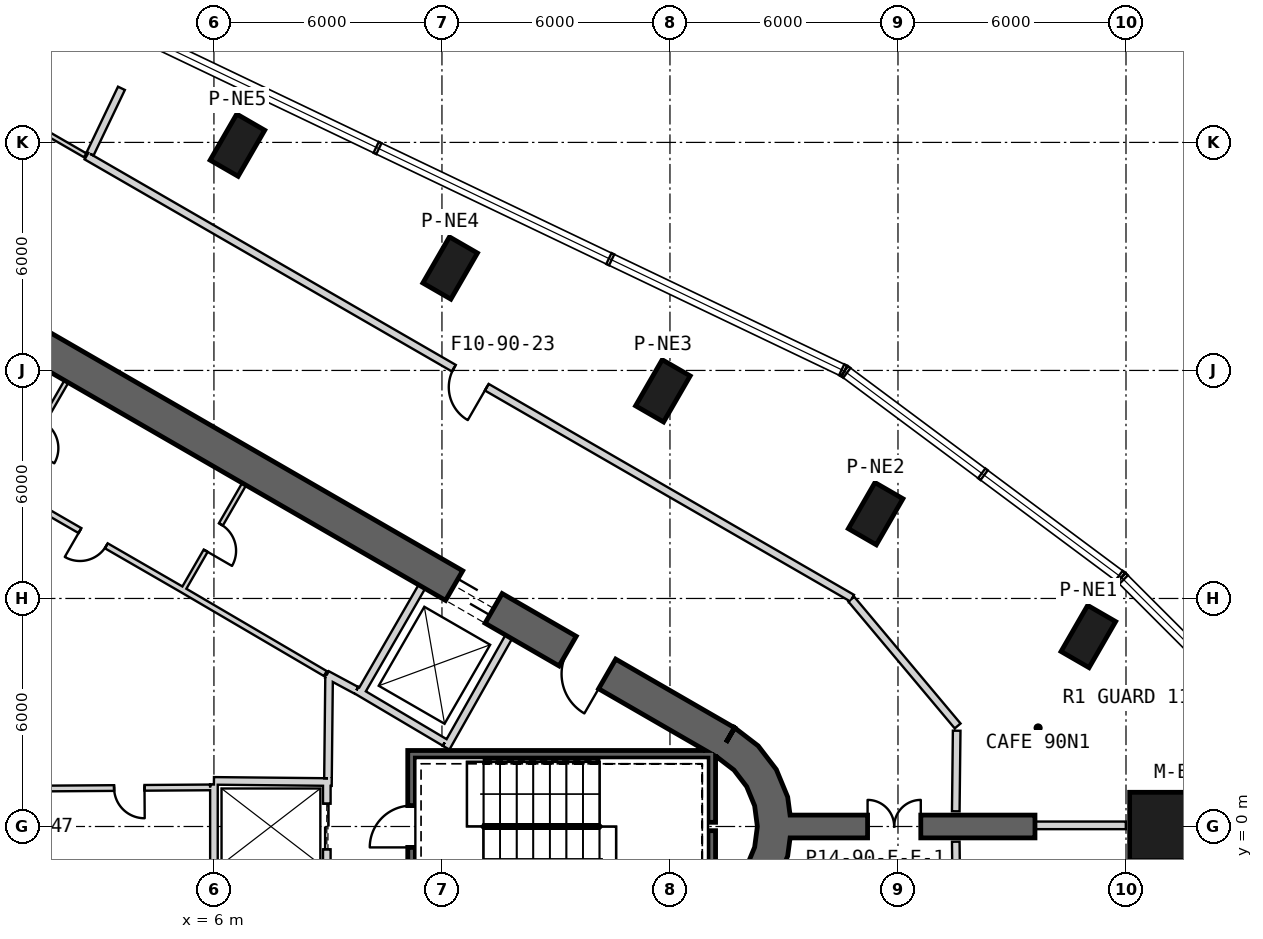
"""IFC4 building model, lengths in metres.
Left out: names, types, materials, properties, quantities, classifications, styles, units other than length and angle.
Written with IfcOpenShell. Run it as: python <this file> out.ifc"""

import sys

from ifc_helpers import new_model, si_unit, direction, frame, frame_2d, origin, origin_2d, place, context, subcontext, project, spatial, polyline, rectangle, outline, extrude, element, fill, save


model = new_model("IFC4")
c1 = context("Model", 3, precision=1e-05, world=origin(), true_north=direction((0.0, 1.0)))
c2 = subcontext(c1, "Body", "Model", "MODEL_VIEW")
j1 = project(units=[si_unit("LENGTHUNIT", "METRE"), si_unit("PLANEANGLEUNIT", "RADIAN")], contexts=[c1])
p1 = place(None, origin())
s1 = spatial("IfcSite", under=j1, at=p1, CompositionType="ELEMENT")
p2 = place(p1, origin())
s2 = spatial("IfcBuilding", under=s1, at=p2, CompositionType="ELEMENT")
p3 = place(p2, frame((0.0, 0.0, 392.3)))
s3 = spatial("IfcBuildingStorey", under=s2, at=p3, CompositionType="ELEMENT", Elevation=392.3)
p4 = place(p3, frame((31.196, 0.0, 0.0), z_axis=(0.0, 0.0, 1.0), x_axis=(1.0, 0.0, 0.0)))
e1 = element("IfcColumn", 1, at=p4, inside=s3, PredefinedType="COLUMN", context=c2, shape_type="SweptSolid", body=[
    extrude(rectangle(XDim=2.2, YDim=1.8, at=origin_2d()), origin(), (0.0, 0.0, 1.0), 5.7),
])
for number, where, z_axis, x_axis in (
    (2, (29.01, 4.999, 0.0), (0.0, 0.0, 1.0), (0.5, 0.866, 0.0)),
    (3, (23.412, 8.231, 0.0), (0.0, 0.0, 1.0), (0.5, 0.866, 0.0)),
    (4, (17.814, 11.463, 0.0), (0.0, 0.0, 1.0), (0.5, 0.866, 0.0)),
    (5, (12.216, 14.695, 0.0), (0.0, 0.0, 1.0), (0.5, 0.866, 0.0)),
    (6, (6.618, 17.927, 0.0), (0.0, 0.0, 1.0), (0.5, 0.866, 0.0)),
):
    element("IfcColumn", number, at=place(p3, frame(where, z_axis=z_axis, x_axis=x_axis)), inside=s3, PredefinedType="COLUMN", context=c2, shape_type="SweptSolid", body=[
        extrude(rectangle(XDim=1.4, YDim=0.85, at=origin_2d()), origin(), (0.0, 0.0, 1.0), 5.7),
    ])
p5 = place(p3, frame((19.475, 2.208, 0.0), z_axis=(0.0, 0.0, 1.0), x_axis=(-0.866028369851, 0.499994862586, 0.0)))
e7 = element("IfcWall", 7, at=p5, inside=s3, PredefinedType="SHEAR", context=c2, shape_type="SweptSolid", body=[
    extrude(rectangle(XDim=31.523, YDim=0.9, at=frame_2d((15.762, 0.0))), origin(), (0.0, 0.0, 1.0), 6.0),
])
p6 = place(p5, frame((7.062, 0.0, 0.0)))
e8 = element("IfcOpeningElement", 8, at=p6, cuts=e7, PredefinedType="OPENING", context=c2, shape_type="SweptSolid", body=[
    extrude(rectangle(XDim=1.2, YDim=2.4, at=frame_2d((0.6, 1.2))), frame((0.0, 0.46, 0.0), z_axis=(0.0, -1.0, 0.0), x_axis=(1.0, 0.0, 0.0)), (0.0, 0.0, 1.0), 0.92),
])
p7 = place(p5, frame((3.612, 0.0, 0.0)))
e9 = element("IfcOpeningElement", 9, at=p7, cuts=e7, PredefinedType="OPENING", context=c2, shape_type="SweptSolid", body=[
    extrude(rectangle(XDim=1.2, YDim=2.4, at=frame_2d((0.6, 1.2))), frame((0.0, 0.46, 0.0), z_axis=(0.0, -1.0, 0.0), x_axis=(1.0, 0.0, 0.0)), (0.0, 0.0, 1.0), 0.92),
])
p8 = place(p5, frame((26.712, 0.0, 0.0)))
e10 = element("IfcOpeningElement", 10, at=p8, cuts=e7, PredefinedType="OPENING", context=c2, shape_type="SweptSolid", body=[
    extrude(rectangle(XDim=1.2, YDim=2.4, at=frame_2d((0.6, 1.2))), frame((0.0, 0.46, 0.0), z_axis=(0.0, -1.0, 0.0), x_axis=(1.0, 0.0, 0.0)), (0.0, 0.0, 1.0), 0.92),
])
p9 = place(p3, origin())
e11 = element("IfcWall", 11, at=p9, inside=s3, PredefinedType="SHEAR", context=c2, shape_type="SweptSolid", body=[
    extrude(outline(polyline([(19.7, -2.598), (20.321, -2.121), (20.798, -1.5), (21.098, -0.777), (21.2, 0.0), (21.098, 0.777), (20.798, 1.5), (20.321, 2.121), (19.7, 2.598), (19.25, 1.819), (19.685, 1.485), (20.019, 1.05), (20.229, 0.543), (20.3, 0.0), (20.229, -0.543), (20.019, -1.05), (19.685, -1.485), (19.25, -1.819), (19.7, -2.598)])), origin(), (0.0, 0.0, 1.0), 6.0),
])
p10 = place(p3, frame((21.15, 0.0, 0.0), z_axis=(0.0, 0.0, 1.0), x_axis=(1.0, 0.0, 0.0)))
e12 = element("IfcWall", 12, at=p10, inside=s3, PredefinedType="SHEAR", context=c2, shape_type="SweptSolid", body=[
    extrude(rectangle(XDim=6.455, YDim=0.6, at=frame_2d((3.228, 0.0))), origin(), (0.0, 0.0, 1.0), 6.0),
])
p11 = place(p10, frame((2.05, 0.0, 0.0)))
e13 = element("IfcOpeningElement", 13, at=p11, cuts=e12, PredefinedType="OPENING", context=c2, shape_type="SweptSolid", body=[
    extrude(rectangle(XDim=1.4, YDim=2.4, at=frame_2d((0.7, 1.2))), frame((0.0, 0.31, 0.0), z_axis=(0.0, -1.0, 0.0), x_axis=(1.0, 0.0, 0.0)), (0.0, 0.0, 1.0), 0.62),
])
p12 = place(p3, frame((9.847, 3.495, 0.0), z_axis=(0.0, 0.0, 1.0), x_axis=(0.499984717929, 0.866034226713, 0.0)))
e14 = element("IfcWall", 14, at=p12, inside=s3, PredefinedType="PLUMBINGWALL", context=c2, shape_type="SweptSolid", body=[
    extrude(rectangle(XDim=3.25, YDim=0.2, at=frame_2d((1.625, 0.0))), origin(), (0.0, 0.0, 1.0), 5.7),
])
p13 = place(p3, frame((12.11, 2.073, 0.0), z_axis=(0.0, 0.0, 1.0), x_axis=(0.49196600604, 0.870614408852, 0.0)))
e15 = element("IfcWall", 15, at=p13, inside=s3, PredefinedType="PLUMBINGWALL", context=c2, shape_type="SweptSolid", body=[
    extrude(rectangle(XDim=3.35, YDim=0.2, at=frame_2d((1.675, 0.0))), origin(), (0.0, 0.0, 1.0), 5.7),
])
p14 = place(p3, frame((12.073, 2.211, 0.0), z_axis=(0.0, 0.0, 1.0), x_axis=(-0.860414880418, 0.509594185166, 0.0)))
e16 = element("IfcWall", 16, at=p14, inside=s3, PredefinedType="PLUMBINGWALL", context=c2, shape_type="SweptSolid", body=[
    extrude(rectangle(XDim=2.7, YDim=0.2, at=frame_2d((1.35, 0.0))), origin(), (0.0, 0.0, 1.0), 5.7),
])
p15 = place(p3, frame((19.2, 1.9, -0.35), z_axis=(0.0, 0.0, 1.0), x_axis=(-1.0, 0.0, 0.0)))
e17 = element("IfcWall", 17, at=p15, inside=s3, PredefinedType="SHEAR", context=c2, shape_type="SweptSolid", body=[
    extrude(rectangle(XDim=8.1, YDim=0.2, at=frame_2d((4.05, 0.0))), origin(), (0.0, 0.0, 1.0), 6.05),
])
p16 = place(p3, frame((19.1, -2.0, -0.35), z_axis=(0.0, 0.0, 1.0), x_axis=(0.0, 1.0, 0.0)))
e18 = element("IfcWall", 18, at=p16, inside=s3, PredefinedType="SHEAR", context=c2, shape_type="SweptSolid", body=[
    extrude(rectangle(XDim=1.89, YDim=0.2, at=frame_2d((0.945, 0.0))), origin(), (0.0, 0.0, 1.0), 6.05),
])
p17 = place(p3, frame((19.1, 0.11, -0.35), z_axis=(0.0, 0.0, 1.0), x_axis=(0.0, 1.0, 0.0)))
e19 = element("IfcWall", 19, at=p17, inside=s3, PredefinedType="SHEAR", context=c2, shape_type="SweptSolid", body=[
    extrude(rectangle(XDim=1.69, YDim=0.2, at=frame_2d((0.845, 0.0))), origin(), (0.0, 0.0, 1.0), 6.05),
])
p18 = place(p3, frame((11.2, -1.8, -0.35), z_axis=(0.0, 0.0, 1.0), x_axis=(0.0, 1.0, 0.0)))
e20 = element("IfcWall", 20, at=p18, inside=s3, PredefinedType="SHEAR", context=c2, shape_type="SweptSolid", body=[
    extrude(rectangle(XDim=3.6, YDim=0.2, at=frame_2d((1.8, 0.0))), origin(), (0.0, 0.0, 1.0), 6.05),
])
p19 = place(p18, frame((1.25, 0.0, 0.35)))
e21 = element("IfcOpeningElement", 21, at=p19, cuts=e20, PredefinedType="OPENING", context=c2, shape_type="SweptSolid", body=[
    extrude(rectangle(XDim=1.1, YDim=2.1, at=frame_2d((0.55, 1.05))), frame((0.0, 0.11, 0.0), z_axis=(0.0, -1.0, 0.0), x_axis=(1.0, 0.0, 0.0)), (0.0, 0.0, 1.0), 0.22),
])
p20 = place(p3, frame((8.97, 1.2, 0.0), z_axis=(0.0, 0.0, 1.0), x_axis=(0.0, -1.0, 0.0)))
e22 = element("IfcWall", 22, at=p20, inside=s3, PredefinedType="PLUMBINGWALL", context=c2, shape_type="SweptSolid", body=[
    extrude(rectangle(XDim=2.4, YDim=0.2, at=frame_2d((1.2, 0.0))), origin(), (0.0, 0.0, 1.0), 5.7),
])
p21 = place(p20, frame((0.6, 0.0, 0.0)))
e23 = element("IfcOpeningElement", 23, at=p21, cuts=e22, PredefinedType="OPENING", context=c2, shape_type="SweptSolid", body=[
    extrude(rectangle(XDim=1.2, YDim=2.4, at=frame_2d((0.6, 1.2))), frame((0.0, 0.11, 0.0), z_axis=(0.0, -1.0, 0.0), x_axis=(1.0, 0.0, 0.0)), (0.0, 0.0, 1.0), 0.22),
])
p22 = place(p3, frame((6.0, 1.2, 0.0), z_axis=(0.0, 0.0, 1.0), x_axis=(0.999949988, -0.010001074852, 0.0)))
e24 = element("IfcWall", 24, at=p22, inside=s3, PredefinedType="PLUMBINGWALL", context=c2, shape_type="SweptSolid", body=[
    extrude(rectangle(XDim=3.1, YDim=0.2, at=frame_2d((1.55, 0.0))), origin(), (0.0, 0.0, 1.0), 5.7),
])
p23 = place(p3, frame((6.0, -1.1, 0.0), z_axis=(0.0, 0.0, 1.0), x_axis=(0.0, 1.0, 0.0)))
e25 = element("IfcWall", 25, at=p23, inside=s3, PredefinedType="PLUMBINGWALL", context=c2, shape_type="SweptSolid", body=[
    extrude(rectangle(XDim=2.205, YDim=0.2, at=frame_2d((1.102, 0.0))), origin(), (0.0, 0.0, 1.0), 5.7),
])
p24 = place(p3, frame((6.795, 9.01, 0.0), z_axis=(0.0, 0.0, 1.0), x_axis=(-0.499984717929, -0.866034226713, 0.0)))
e26 = element("IfcWall", 26, at=p24, inside=s3, PredefinedType="PARTITIONING", context=c2, shape_type="SweptSolid", body=[
    extrude(rectangle(XDim=3.25, YDim=0.12, at=frame_2d((1.625, 0.0))), origin(), (0.0, 0.0, 1.0), 5.7),
])
p25 = place(p24, frame((1.225, 0.0, 0.0)))
e27 = element("IfcOpeningElement", 27, at=p25, cuts=e26, PredefinedType="OPENING", context=c2, shape_type="SweptSolid", body=[
    extrude(rectangle(XDim=0.8, YDim=2.1, at=frame_2d((0.4, 1.05))), frame((0.0, 0.07, 0.0), z_axis=(0.0, -1.0, 0.0), x_axis=(1.0, 0.0, 0.0)), (0.0, 0.0, 1.0), 0.14),
])
p26 = place(p3, frame((8.974, 3.999, 0.0), z_axis=(0.0, 0.0, 1.0), x_axis=(0.880917147855, -0.473270513147, 0.0)))
e28 = element("IfcWall", 28, at=p26, inside=s3, PredefinedType="PARTITIONING", context=c2, shape_type="SweptSolid", body=[
    extrude(rectangle(XDim=0.878, YDim=0.2, at=frame_2d((0.439, 0.0))), origin(), (0.0, 0.0, 1.0), 5.7),
])
p27 = place(p3, frame((8.931, 4.025, 0.0), z_axis=(0.0, 0.0, 1.0), x_axis=(-0.862666884027, 0.505772525157, 0.0)))
e29 = element("IfcWall", 29, at=p27, inside=s3, PredefinedType="PLUMBINGWALL", context=c2, shape_type="SweptSolid", body=[
    extrude(rectangle(XDim=4.372, YDim=0.15, at=frame_2d((2.186, 0.0))), origin(), (0.0, 0.0, 1.0), 5.7),
])
p28 = place(p3, frame((2.119, 11.709, 0.0), z_axis=(0.0, 0.0, 1.0), x_axis=(-0.500017246033, -0.866015446554, 0.0)))
e30 = element("IfcWall", 30, at=p28, inside=s3, PredefinedType="PARTITIONING", context=c2, shape_type="SweptSolid", body=[
    extrude(rectangle(XDim=3.25, YDim=0.12, at=frame_2d((1.625, 0.0))), origin(), (0.0, 0.0, 1.0), 5.7),
])
p29 = place(p28, frame((1.225, 0.0, 0.0)))
e31 = element("IfcOpeningElement", 31, at=p29, cuts=e30, PredefinedType="OPENING", context=c2, shape_type="SweptSolid", body=[
    extrude(rectangle(XDim=0.8, YDim=2.1, at=frame_2d((0.4, 1.05))), frame((0.0, 0.07, 0.0), z_axis=(0.0, -1.0, 0.0), x_axis=(1.0, 0.0, 0.0)), (0.0, 0.0, 1.0), 0.14),
])
p30 = place(p3, frame((5.159, 6.236, 0.0), z_axis=(0.0, 0.0, 1.0), x_axis=(-0.866028230842, 0.499995103361, 0.0)))
e32 = element("IfcWall", 32, at=p30, inside=s3, PredefinedType="PLUMBINGWALL", context=c2, shape_type="SweptSolid", body=[
    extrude(rectangle(XDim=5.4, YDim=0.15, at=frame_2d((2.7, 0.0))), origin(), (0.0, 0.0, 1.0), 5.7),
])
p31 = place(p30, frame((2.3, 0.0, 0.0)))
e33 = element("IfcOpeningElement", 33, at=p31, cuts=e32, PredefinedType="OPENING", context=c2, shape_type="SweptSolid", body=[
    extrude(rectangle(XDim=0.8, YDim=2.1, at=frame_2d((0.4, 1.05))), frame((0.0, 0.085, 0.0), z_axis=(0.0, -1.0, 0.0), x_axis=(1.0, 0.0, 0.0)), (0.0, 0.0, 1.0), 0.17),
])
p32 = place(p3, frame((9.001, 1.27, 0.0), z_axis=(0.0, 0.0, 1.0), x_axis=(0.01074821465, 0.999942236273, 0.0)))
e34 = element("IfcWall", 34, at=p32, inside=s3, PredefinedType="PARTITIONING", context=c2, shape_type="SweptSolid", body=[
    extrude(rectangle(XDim=2.726, YDim=0.2, at=frame_2d((1.363, 0.0))), origin(), (0.0, 0.0, 1.0), 5.7),
])
p33 = place(p3, frame((1.518, 0.999, 0.0), z_axis=(0.0, 0.0, 1.0), x_axis=(0.999976903524, 0.006796500403, 0.0)))
e35 = element("IfcWall", 35, at=p33, inside=s3, PredefinedType="PLUMBINGWALL", context=c2, shape_type="SweptSolid", body=[
    extrude(rectangle(XDim=4.382, YDim=0.15, at=frame_2d((2.191, 0.0))), origin(), (0.0, 0.0, 1.0), 5.7),
])
p34 = place(p33, frame((1.855, 0.0, 0.0)))
e36 = element("IfcOpeningElement", 36, at=p34, cuts=e35, PredefinedType="OPENING", context=c2, shape_type="SweptSolid", body=[
    extrude(rectangle(XDim=0.8, YDim=2.1, at=frame_2d((0.4, 1.05))), frame((0.0, 0.085, 0.0), z_axis=(0.0, -1.0, 0.0), x_axis=(1.0, 0.0, 0.0)), (0.0, 0.0, 1.0), 0.17),
])
p35 = place(p3, frame((22.792, 6.009, 0.0), z_axis=(0.0, 0.0, 1.0), x_axis=(-0.866028288731, 0.499995003092, 0.0)))
e37 = element("IfcWall", 37, at=p35, inside=s3, PredefinedType="PARTITIONING", context=c2, shape_type="SweptSolid", body=[
    extrude(rectangle(XDim=23.262, YDim=0.2, at=frame_2d((11.631, 0.0))), origin(), (0.0, 0.0, 1.0), 5.07),
])
p36 = place(p35, frame((11.1, 0.0, 0.0)))
e38 = element("IfcOpeningElement", 38, at=p36, cuts=e37, PredefinedType="OPENING", context=c2, shape_type="SweptSolid", body=[
    extrude(rectangle(XDim=1.0, YDim=2.1, at=frame_2d((0.5, 1.05))), frame((0.0, 0.11, 0.0), z_axis=(0.0, -1.0, 0.0), x_axis=(1.0, 0.0, 0.0)), (0.0, 0.0, 1.0), 0.22),
])
p37 = place(p3, frame((25.57, 2.646, 0.0), z_axis=(0.0, 0.0, 1.0), x_axis=(-0.642788443189, 0.766043743727, 0.0)))
e39 = element("IfcWall", 39, at=p37, inside=s3, PredefinedType="PARTITIONING", context=c2, shape_type="SweptSolid", body=[
    extrude(rectangle(XDim=4.356, YDim=0.2, at=frame_2d((2.178, 0.0))), origin(), (0.0, 0.0, 1.0), 5.07),
])
p38 = place(p3, frame((25.521, 0.4, 0.0), z_axis=(0.0, 0.0, 1.0), x_axis=(0.011167985113, 0.99993763611, 0.0)))
e40 = element("IfcWall", 40, at=p38, inside=s3, PredefinedType="PARTITIONING", context=c2, shape_type="SweptSolid", body=[
    extrude(rectangle(XDim=2.121, YDim=0.2, at=frame_2d((1.06, 0.0))), origin(), (0.0, 0.0, 1.0), 5.7),
])
p39 = place(p3, frame((2.612, 17.66, 0.0), z_axis=(0.0, 0.0, 1.0), x_axis=(-0.866027543104, 0.499996294571, 0.0)))
e41 = element("IfcWall", 41, at=p39, inside=s3, PredefinedType="PARTITIONING", context=c2, shape_type="SweptSolid", body=[
    extrude(rectangle(XDim=10.007, YDim=0.12, at=frame_2d((5.003, 0.0))), origin(), (0.0, 0.0, 1.0), 5.07),
])
p40 = place(p39, frame((4.532, 0.0, 0.0)))
e42 = element("IfcOpeningElement", 42, at=p40, cuts=e41, PredefinedType="OPENING", context=c2, shape_type="SweptSolid", body=[
    extrude(rectangle(XDim=1.0, YDim=2.1, at=frame_2d((0.5, 1.05))), frame((0.0, 0.07, 0.0), z_axis=(0.0, -1.0, 0.0), x_axis=(1.0, 0.0, 0.0)), (0.0, 0.0, 1.0), 0.14),
])
p41 = place(p3, frame((3.566, 19.423, 0.0), z_axis=(0.0, 0.0, 1.0), x_axis=(-0.431188597571, -0.902261820829, 0.0)))
e43 = element("IfcWall", 43, at=p41, inside=s3, PredefinedType="PARTITIONING", context=c2, shape_type="SweptSolid", body=[
    extrude(rectangle(XDim=1.91, YDim=0.2, at=frame_2d((0.955, 0.0))), origin(), (0.0, 0.0, 1.0), 4.07),
])
p42 = place(p3, frame((27.605, 0.03, 0.0), z_axis=(0.0, 0.0, 1.0), x_axis=(1.0, 0.0, 0.0)))
e44 = element("IfcWall", 44, at=p42, inside=s3, PredefinedType="PARTITIONING", context=c2, shape_type="SweptSolid", body=[
    extrude(rectangle(XDim=2.391, YDim=0.2, at=frame_2d((1.195, 0.0))), origin(), (0.0, 0.0, 1.0), 5.27),
])
p43 = place(p3, frame((25.547, -2.711, 0.0), z_axis=(0.0, 0.0, 1.0), x_axis=(-0.011197269672, 0.999937308611, 0.0)))
e45 = element("IfcWall", 45, at=p43, inside=s3, PredefinedType="PARTITIONING", context=c2, shape_type="SweptSolid", body=[
    extrude(rectangle(XDim=2.311, YDim=0.2, at=frame_2d((1.156, 0.0))), origin(), (0.0, 0.0, 1.0), 5.7),
])
p44 = place(p19, origin())
e46 = element("IfcDoor", 46, at=p44, inside=s3, OperationType="SINGLE_SWING_LEFT", PredefinedType="USERDEFINED", context=c2, shape_type="SweptSolid", body=[
    extrude(rectangle(XDim=1.1, YDim=2.1, at=frame_2d((0.55, 1.05))), frame((0.0, 0.025, 0.0), z_axis=(0.0, -1.0, 0.0), x_axis=(1.0, 0.0, 0.0)), (0.0, 0.0, 1.0), 0.05),
])
fill(e21, e46)
p45 = place(p21, origin())
e47 = element("IfcDoor", 47, at=p45, inside=s3, OperationType="SLIDING_TO_LEFT", PredefinedType="USERDEFINED", context=c2, shape_type="SweptSolid", body=[
    extrude(rectangle(XDim=1.2, YDim=2.4, at=frame_2d((0.6, 1.2))), frame((0.0, 0.025, 0.0), z_axis=(0.0, -1.0, 0.0), x_axis=(1.0, 0.0, 0.0)), (0.0, 0.0, 1.0), 0.05),
])
fill(e23, e47)
p46 = place(p34, origin())
e48 = element("IfcDoor", 48, at=p46, inside=s3, OperationType="SINGLE_SWING_RIGHT", PredefinedType="USERDEFINED", context=c2, shape_type="SweptSolid", body=[
    extrude(rectangle(XDim=0.8, YDim=2.1, at=frame_2d((0.4, 1.05))), frame((0.0, 0.025, 0.0), z_axis=(0.0, -1.0, 0.0), x_axis=(1.0, 0.0, 0.0)), (0.0, 0.0, 1.0), 0.05),
])
fill(e36, e48)
p47 = place(p25, origin())
e49 = element("IfcDoor", 49, at=p47, inside=s3, OperationType="SINGLE_SWING_RIGHT", PredefinedType="USERDEFINED", context=c2, shape_type="SweptSolid", body=[
    extrude(rectangle(XDim=0.8, YDim=2.1, at=frame_2d((0.4, 1.05))), frame((0.0, 0.025, 0.0), z_axis=(0.0, -1.0, 0.0), x_axis=(1.0, 0.0, 0.0)), (0.0, 0.0, 1.0), 0.05),
])
fill(e27, e49)
p48 = place(p31, origin())
e50 = element("IfcDoor", 50, at=p48, inside=s3, OperationType="SINGLE_SWING_RIGHT", PredefinedType="USERDEFINED", context=c2, shape_type="SweptSolid", body=[
    extrude(rectangle(XDim=0.8, YDim=2.1, at=frame_2d((0.4, 1.05))), frame((0.0, 0.025, 0.0), z_axis=(0.0, -1.0, 0.0), x_axis=(1.0, 0.0, 0.0)), (0.0, 0.0, 1.0), 0.05),
])
fill(e33, e50)
p49 = place(p36, origin())
e51 = element("IfcDoor", 51, at=p49, inside=s3, OperationType="SINGLE_SWING_LEFT", PredefinedType="USERDEFINED", context=c2, shape_type="SweptSolid", body=[
    extrude(rectangle(XDim=1.0, YDim=2.1, at=frame_2d((0.5, 1.05))), frame((0.0, 0.025, 0.0), z_axis=(0.0, -1.0, 0.0), x_axis=(1.0, 0.0, 0.0)), (0.0, 0.0, 1.0), 0.05),
])
fill(e38, e51)
p50 = place(p6, origin())
e52 = element("IfcDoor", 52, at=p50, inside=s3, OperationType="SLIDING_TO_LEFT", PredefinedType="USERDEFINED", context=c2, shape_type="SweptSolid", body=[
    extrude(rectangle(XDim=1.2, YDim=2.4, at=frame_2d((0.6, 1.2))), frame((0.0, 0.025, 0.0), z_axis=(0.0, -1.0, 0.0), x_axis=(1.0, 0.0, 0.0)), (0.0, 0.0, 1.0), 0.05),
])
fill(e8, e52)
p51 = place(p7, origin())
e53 = element("IfcDoor", 53, at=p51, inside=s3, OperationType="SINGLE_SWING_LEFT", PredefinedType="USERDEFINED", context=c2, shape_type="SweptSolid", body=[
    extrude(rectangle(XDim=1.2, YDim=2.4, at=frame_2d((0.6, 1.2))), frame((0.0, 0.025, 0.0), z_axis=(0.0, -1.0, 0.0), x_axis=(1.0, 0.0, 0.0)), (0.0, 0.0, 1.0), 0.05),
])
fill(e9, e53)
p52 = place(p11, origin())
e54 = element("IfcDoor", 54, at=p52, inside=s3, OperationType="DOUBLE_DOOR_SINGLE_SWING", PredefinedType="NOTDEFINED", context=c2, shape_type="SweptSolid", body=[
    extrude(rectangle(XDim=1.4, YDim=2.4, at=frame_2d((0.7, 1.2))), frame((0.0, 0.025, 0.0), z_axis=(0.0, -1.0, 0.0), x_axis=(1.0, 0.0, 0.0)), (0.0, 0.0, 1.0), 0.05),
])
fill(e13, e54)
save(model, sys.argv[1])
